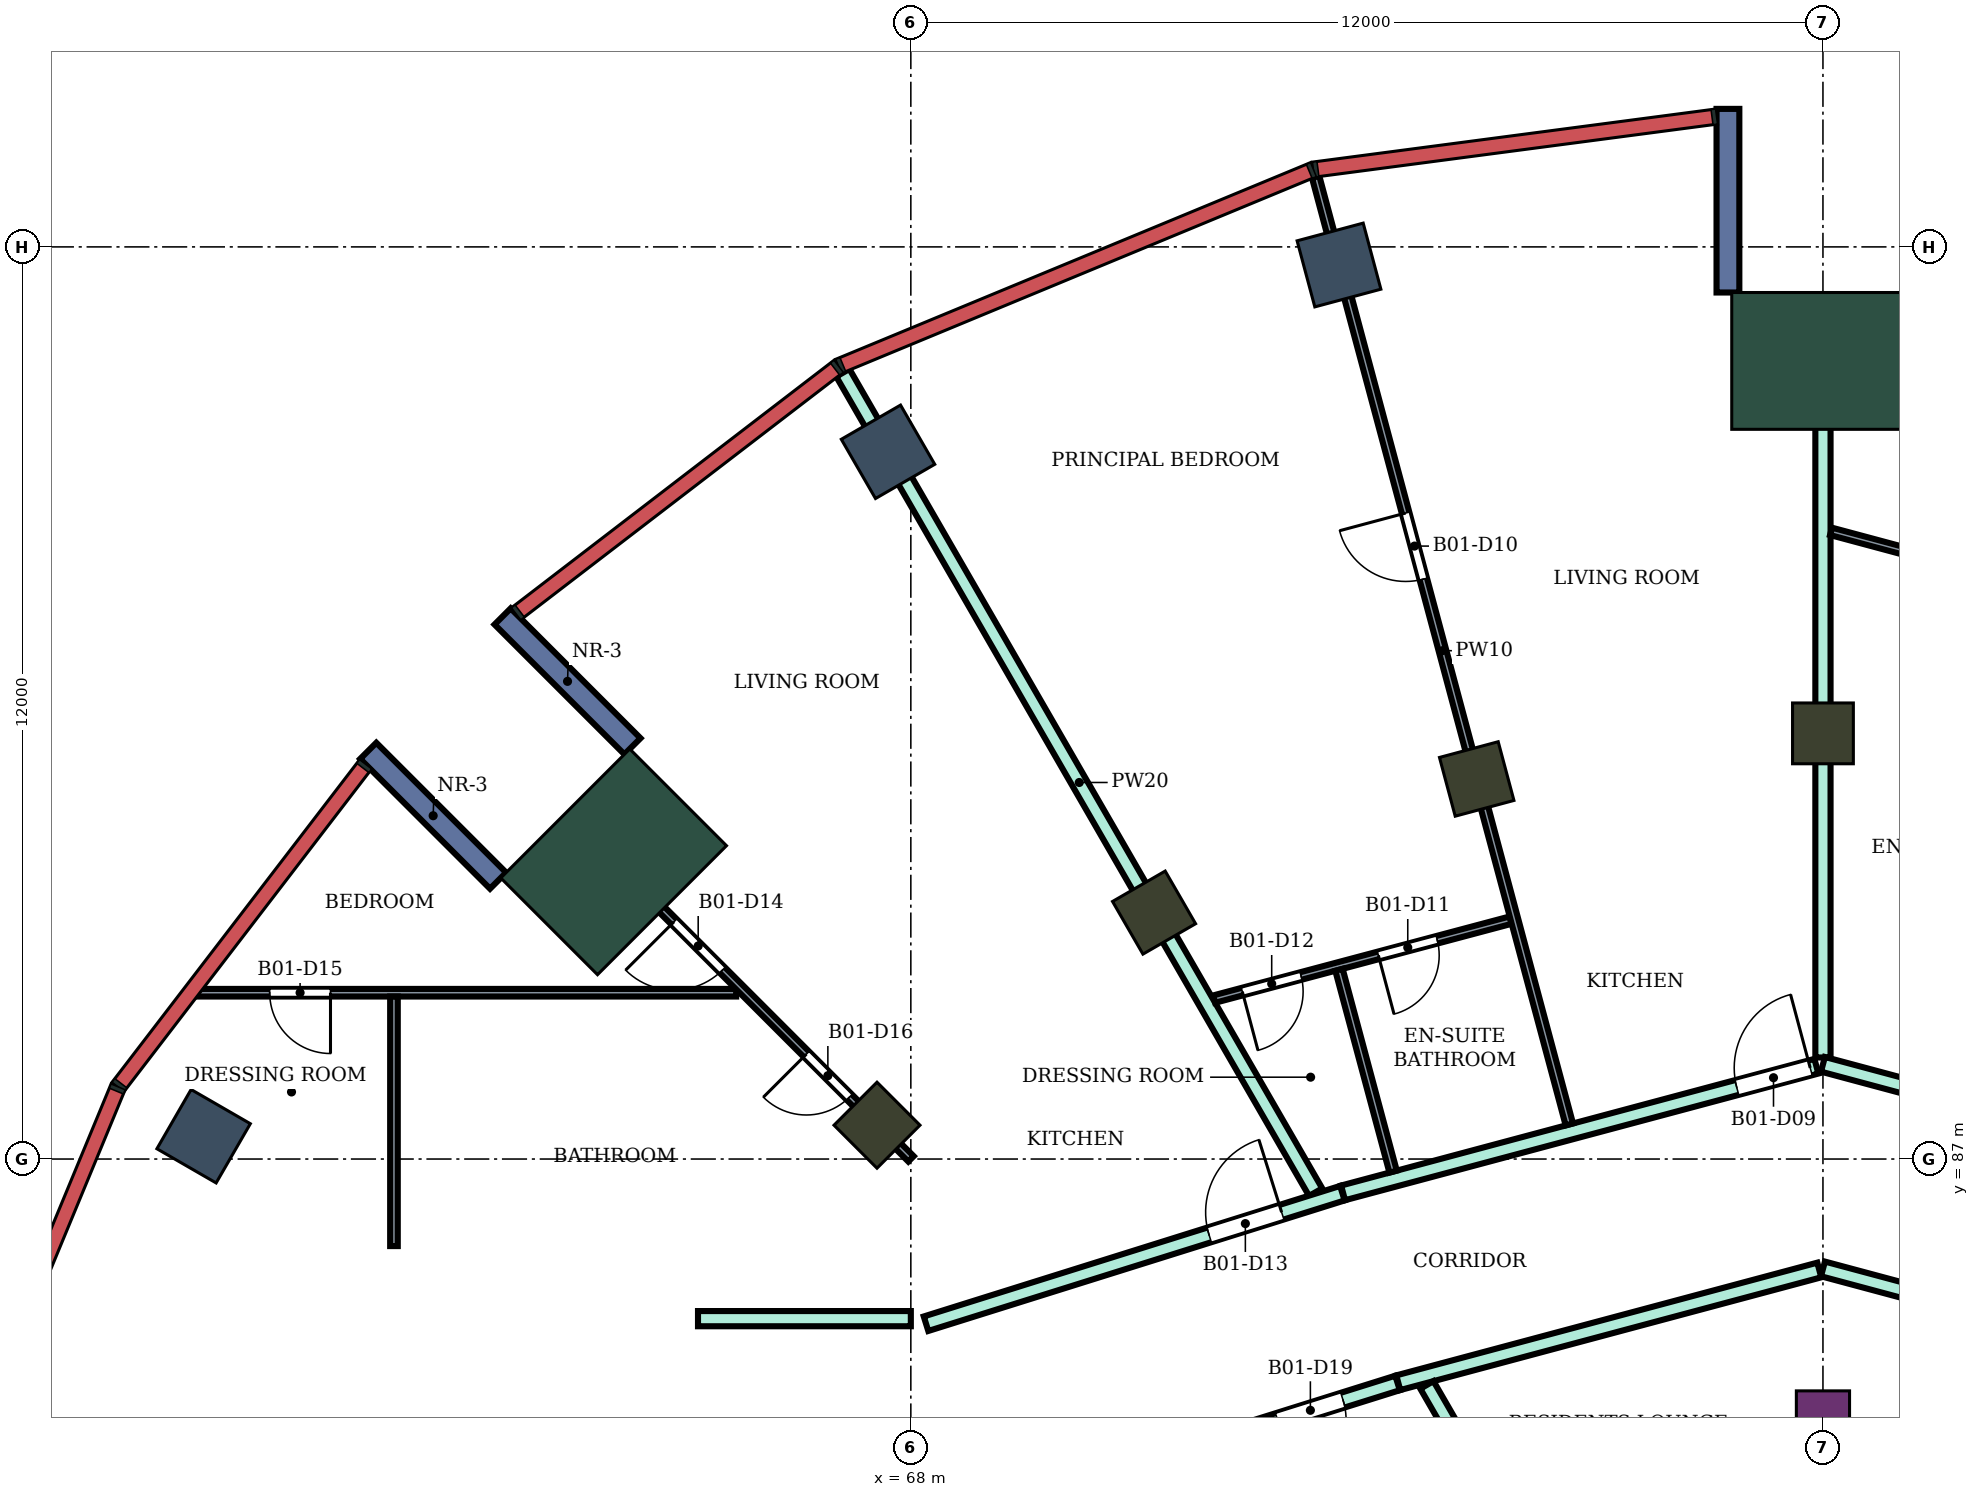
"""IFC4 building model, lengths in metres.
Left out: names, types, materials, properties, quantities, classifications, styles, units other than length and angle.
Written with IfcOpenShell. Run it as: python <this file> out.ifc"""

import sys

from ifc_helpers import new_model, si_unit, direction, frame, frame_2d, origin, origin_2d, place, context, subcontext, project, spatial, rectangle, extrude, element, fill, save


model = new_model("IFC4")
c1 = context("Model", 3, precision=1e-05, world=origin(), true_north=direction((0.0, 1.0)))
c2 = subcontext(c1, "Body", "Model", "MODEL_VIEW")
j1 = project(units=[si_unit("LENGTHUNIT", "METRE"), si_unit("PLANEANGLEUNIT", "RADIAN")], contexts=[c1])
p1 = place(None, origin())
s1 = spatial("IfcSite", under=j1, at=p1, CompositionType="ELEMENT")
p2 = place(p1, origin())
s2 = spatial("IfcBuilding", under=s1, at=p2, CompositionType="ELEMENT")
p3 = place(p2, frame((0.0, 0.0, 216.7)))
s3 = spatial("IfcBuildingStorey", under=s2, at=p3, CompositionType="ELEMENT", Elevation=216.7)
for number, where, z_axis, x_axis in (
    (1, (73.633, 98.762, 0.0), (0.0, 0.0, 1.0), (-0.259, 0.966, 0.0)),
    (2, (67.7, 96.304, 0.0), (0.0, 0.0, 1.0), (-0.5, 0.866, 0.0)),
    (3, (58.696, 87.3, 0.0), (0.0, 0.0, 1.0), (-0.866, 0.5, 0.0)),
):
    element("IfcColumn", number, at=place(p3, frame(where, z_axis=z_axis, x_axis=x_axis)), inside=s3, PredefinedType="COLUMN", context=c2, shape_type="SweptSolid", body=[
        extrude(rectangle(XDim=0.9, YDim=0.9, at=origin_2d()), origin(), (0.0, 0.0, 1.0), 4.2),
    ])
for number, where, z_axis, x_axis in (
    (4, (80.0, 92.6, 0.0), (0.0, 0.0, 1.0), (0.0, 1.0, 0.0)),
    (5, (75.445, 92.0, 0.0), (0.0, 0.0, 1.0), (-0.259, 0.966, 0.0)),
    (6, (71.2, 90.242, 0.0), (0.0, 0.0, 1.0), (-0.5, 0.866, 0.0)),
    (7, (67.555, 87.445, 0.0), (0.0, 0.0, 1.0), (-0.707, 0.707, 0.0)),
):
    element("IfcColumn", number, at=place(p3, frame(where, z_axis=z_axis, x_axis=x_axis)), inside=s3, PredefinedType="COLUMN", context=c2, shape_type="SweptSolid", body=[
        extrude(rectangle(XDim=0.8, YDim=0.8, at=origin_2d()), origin(), (0.0, 0.0, 1.0), 4.2),
    ])
p4 = place(p3, frame((80.0, 83.6, 0.0), z_axis=(0.0, 0.0, 1.0), x_axis=(0.0, 1.0, 0.0)))
e8 = element("IfcColumn", 8, at=p4, inside=s3, PredefinedType="COLUMN", context=c2, shape_type="SweptSolid", body=[
    extrude(rectangle(XDim=0.7, YDim=0.7, at=origin_2d()), origin(), (0.0, 0.0, 1.0), 4.2),
])
for number, where, z_axis, x_axis in (
    (9, (80.0, 97.5, 0.0), (0.0, 0.0, 1.0), (0.0, 1.0, 0.0)),
    (10, (64.09, 90.91, 0.0), (0.0, 0.0, 1.0), (-0.707, 0.707, 0.0)),
):
    element("IfcColumn", number, at=place(p3, frame(where, z_axis=z_axis, x_axis=x_axis)), inside=s3, PredefinedType="COLUMN", context=c2, shape_type="SweptSolid", body=[
        extrude(rectangle(XDim=1.8, YDim=2.4, at=origin_2d()), origin(), (0.0, 0.0, 1.0), 4.2),
    ])
for number, where, z_axis, x_axis in (
    (11, (78.75, 98.4, 0.0), (0.0, 0.0, 1.0), (0.0, 1.0, 0.0)),
    (12, (64.338, 92.43, 0.0), (0.0, 0.0, 1.0), (-0.707, 0.707, 0.0)),
    (13, (62.57, 90.662, 0.0), (0.0, 0.0, 1.0), (-0.707, 0.707, 0.0)),
):
    element("IfcWall", number, at=place(p3, frame(where, z_axis=z_axis, x_axis=x_axis)), inside=s3, PredefinedType="NOTDEFINED", context=c2, shape_type="SweptSolid", body=[
        extrude(rectangle(XDim=2.416, YDim=0.3, at=frame_2d((1.208, 0.0))), origin(), (0.0, 0.0, 1.0), 4.2),
    ])
p5 = place(p3, frame((65.2, 84.9, 0.0), z_axis=(0.0, 0.0, 1.0), x_axis=(1.0, 0.0, 0.0)))
e14 = element("IfcWall", 14, at=p5, inside=s3, PredefinedType="PARTITIONING", context=c2, shape_type="SweptSolid", body=[
    extrude(rectangle(XDim=2.8, YDim=0.2, at=frame_2d((1.4, 0.0))), origin(), (0.0, 0.0, 1.0), 3.75),
])
p6 = place(p3, frame((67.105, 97.344, 0.0), z_axis=(0.0, 0.0, 1.0), x_axis=(0.499841888023, -0.866116670534, 0.0)))
e15 = element("IfcWall", 15, at=p6, inside=s3, PredefinedType="PARTITIONING", context=c2, shape_type="SweptSolid", body=[
    extrude(rectangle(XDim=12.446, YDim=0.2, at=frame_2d((6.223, 0.0))), origin(), (0.0, 0.0, 1.0), 3.75),
])
p7 = place(p3, frame((68.2, 84.833, 0.0), z_axis=(0.0, 0.0, 1.0), x_axis=(0.954204109499, 0.299156342762, 0.0)))
e16 = element("IfcWall", 16, at=p7, inside=s3, PredefinedType="PARTITIONING", context=c2, shape_type="SweptSolid", body=[
    extrude(rectangle(XDim=5.74, YDim=0.2, at=frame_2d((2.87, 0.0))), origin(), (0.0, 0.0, 1.0), 3.75),
])
p8 = place(p7, frame((3.903, 0.0, 0.0)))
e17 = element("IfcOpeningElement", 17, at=p8, cuts=e16, PredefinedType="OPENING", context=c2, shape_type="SweptSolid", body=[
    extrude(rectangle(XDim=1.0, YDim=2.1, at=frame_2d((0.5, 1.05))), frame((0.0, 0.11, 0.0), z_axis=(0.0, -1.0, 0.0), x_axis=(1.0, 0.0, 0.0)), (0.0, 0.0, 1.0), 0.22),
])
p9 = place(p3, frame((72.1, 83.332, 0.0), z_axis=(0.0, 0.0, 1.0), x_axis=(0.954233106619, 0.299063836383, 0.0)))
e18 = element("IfcWall", 18, at=p9, inside=s3, PredefinedType="PARTITIONING", context=c2, shape_type="SweptSolid", body=[
    extrude(rectangle(XDim=2.414, YDim=0.2, at=frame_2d((1.207, 0.0))), origin(), (0.0, 0.0, 1.0), 3.75),
])
p10 = place(p9, frame((0.762, 0.0, 0.0)))
e19 = element("IfcOpeningElement", 19, at=p10, cuts=e18, PredefinedType="OPENING", context=c2, shape_type="SweptSolid", body=[
    extrude(rectangle(XDim=0.9, YDim=2.1, at=frame_2d((0.45, 1.05))), frame((0.0, 0.11, 0.0), z_axis=(0.0, -1.0, 0.0), x_axis=(1.0, 0.0, 0.0)), (0.0, 0.0, 1.0), 0.22),
])
p11 = place(p3, frame((73.687, 86.555, 0.0), z_axis=(0.0, 0.0, 1.0), x_axis=(0.966020868517, 0.258464081818, 0.0)))
e20 = element("IfcWall", 20, at=p11, inside=s3, PredefinedType="PARTITIONING", context=c2, shape_type="SweptSolid", body=[
    extrude(rectangle(XDim=6.446, YDim=0.2, at=frame_2d((3.223, 0.0))), origin(), (0.0, 0.0, 1.0), 3.75),
])
p12 = place(p11, frame((5.362, 0.0, 0.0)))
e21 = element("IfcOpeningElement", 21, at=p12, cuts=e20, PredefinedType="OPENING", context=c2, shape_type="SweptSolid", body=[
    extrude(rectangle(XDim=1.0, YDim=2.1, at=frame_2d((0.5, 1.05))), frame((0.0, 0.11, 0.0), z_axis=(0.0, -1.0, 0.0), x_axis=(1.0, 0.0, 0.0)), (0.0, 0.0, 1.0), 0.22),
])
p13 = place(p3, frame((74.413, 84.057, 0.0), z_axis=(0.0, 0.0, 1.0), x_axis=(0.965970849692, 0.258650956976, 0.0)))
e22 = element("IfcWall", 22, at=p13, inside=s3, PredefinedType="PARTITIONING", context=c2, shape_type="SweptSolid", body=[
    extrude(rectangle(XDim=5.734, YDim=0.2, at=frame_2d((2.867, 0.0))), origin(), (0.0, 0.0, 1.0), 3.75),
])
p14 = place(p3, frame((74.79, 84.028, 0.0), z_axis=(0.0, 0.0, 1.0), x_axis=(0.499820708267, -0.866128893172, 0.0)))
e23 = element("IfcWall", 23, at=p14, inside=s3, PredefinedType="PARTITIONING", context=c2, shape_type="SweptSolid", body=[
    extrude(rectangle(XDim=2.725, YDim=0.2, at=frame_2d((1.362, 0.0))), origin(), (0.0, 0.0, 1.0), 3.75),
])
p15 = place(p3, frame((80.0, 85.554, 0.0), z_axis=(0.0, 0.0, 1.0), x_axis=(0.965894438951, -0.258936155845, 0.0)))
e24 = element("IfcWall", 24, at=p15, inside=s3, PredefinedType="PARTITIONING", context=c2, shape_type="SweptSolid", body=[
    extrude(rectangle(XDim=5.774, YDim=0.2, at=frame_2d((2.887, 0.0))), origin(), (0.0, 0.0, 1.0), 3.75),
])
p16 = place(p15, frame((1.841, 0.0, 0.0)))
e25 = element("IfcOpeningElement", 25, at=p16, cuts=e24, PredefinedType="OPENING", context=c2, shape_type="SweptSolid", body=[
    extrude(rectangle(XDim=1.8, YDim=2.1, at=frame_2d((0.9, 1.05))), frame((0.0, 0.11, 0.0), z_axis=(0.0, -1.0, 0.0), x_axis=(1.0, 0.0, 0.0)), (0.0, 0.0, 1.0), 0.22),
])
p17 = place(p3, frame((80.0, 88.336, 0.0), z_axis=(0.0, 0.0, 1.0), x_axis=(0.0, 1.0, 0.0)))
e26 = element("IfcWall", 26, at=p17, inside=s3, PredefinedType="PARTITIONING", context=c2, shape_type="SweptSolid", body=[
    extrude(rectangle(XDim=9.864, YDim=0.2, at=frame_2d((4.932, 0.0))), origin(), (0.0, 0.0, 1.0), 3.75),
])
p18 = place(p3, frame((80.0, 88.246, 0.0), z_axis=(0.0, 0.0, 1.0), x_axis=(0.965866355913, -0.25904088966, 0.0)))
e27 = element("IfcWall", 27, at=p18, inside=s3, PredefinedType="PARTITIONING", context=c2, shape_type="SweptSolid", body=[
    extrude(rectangle(XDim=6.526, YDim=0.2, at=frame_2d((3.263, 0.0))), origin(), (0.0, 0.0, 1.0), 3.75),
])
p19 = place(p3, frame((58.6, 89.188, 0.0), z_axis=(0.0, 0.0, 1.0), x_axis=(1.0, 0.0, 0.0)))
e28 = element("IfcWall", 28, at=p19, inside=s3, PredefinedType="PARTITIONING", context=c2, shape_type="SweptSolid", body=[
    extrude(rectangle(XDim=7.102, YDim=0.1, at=frame_2d((3.551, 0.0))), origin(), (0.0, 0.0, 1.0), 3.75),
])
p20 = place(p19, frame((0.965, 0.0, 0.0)))
e29 = element("IfcOpeningElement", 29, at=p20, cuts=e28, PredefinedType="OPENING", context=c2, shape_type="SweptSolid", body=[
    extrude(rectangle(XDim=0.8, YDim=2.1, at=frame_2d((0.4, 1.05))), frame((0.0, 0.06, 0.0), z_axis=(0.0, -1.0, 0.0), x_axis=(1.0, 0.0, 0.0)), (0.0, 0.0, 1.0), 0.12),
])
p21 = place(p3, frame((61.2, 85.855, 0.0), z_axis=(0.0, 0.0, 1.0), x_axis=(0.0, 1.0, 0.0)))
e30 = element("IfcWall", 30, at=p21, inside=s3, PredefinedType="PARTITIONING", context=c2, shape_type="SweptSolid", body=[
    extrude(rectangle(XDim=3.283, YDim=0.1, at=frame_2d((1.642, 0.0))), origin(), (0.0, 0.0, 1.0), 3.75),
])
p22 = place(p3, frame((63.598, 91.408, 0.0), z_axis=(0.0, 0.0, 1.0), x_axis=(0.70693039891, -0.707283119477, 0.0)))
e31 = element("IfcWall", 31, at=p22, inside=s3, PredefinedType="PARTITIONING", context=c2, shape_type="SweptSolid", body=[
    extrude(rectangle(XDim=6.229, YDim=0.1, at=frame_2d((3.115, 0.0))), origin(), (0.0, 0.0, 1.0), 3.75),
])
p23 = place(p22, frame((1.819, 0.0, 0.0)))
e32 = element("IfcOpeningElement", 32, at=p23, cuts=e31, PredefinedType="OPENING", context=c2, shape_type="SweptSolid", body=[
    extrude(rectangle(XDim=0.9, YDim=2.1, at=frame_2d((0.45, 1.05))), frame((0.0, 0.06, 0.0), z_axis=(0.0, -1.0, 0.0), x_axis=(1.0, 0.0, 0.0)), (0.0, 0.0, 1.0), 0.12),
])
p24 = place(p22, frame((4.282, 0.0, 0.0)))
e33 = element("IfcOpeningElement", 33, at=p24, cuts=e31, PredefinedType="OPENING", context=c2, shape_type="SweptSolid", body=[
    extrude(rectangle(XDim=0.8, YDim=2.1, at=frame_2d((0.4, 1.05))), frame((0.0, 0.06, 0.0), z_axis=(0.0, -1.0, 0.0), x_axis=(1.0, 0.0, 0.0)), (0.0, 0.0, 1.0), 0.12),
])
p25 = place(p3, frame((71.991, 89.104, 0.0), z_axis=(0.0, 0.0, 1.0), x_axis=(0.96632826418, 0.257312428472, 0.0)))
e34 = element("IfcWall", 34, at=p25, inside=s3, PredefinedType="PARTITIONING", context=c2, shape_type="SweptSolid", body=[
    extrude(rectangle(XDim=4.035, YDim=0.1, at=frame_2d((2.018, 0.0))), origin(), (0.0, 0.0, 1.0), 3.75),
])
p26 = place(p25, frame((2.235, 0.0, 0.0)))
e35 = element("IfcOpeningElement", 35, at=p26, cuts=e34, PredefinedType="OPENING", context=c2, shape_type="SweptSolid", body=[
    extrude(rectangle(XDim=0.8, YDim=2.1, at=frame_2d((0.4, 1.05))), frame((0.0, 0.06, 0.0), z_axis=(0.0, -1.0, 0.0), x_axis=(1.0, 0.0, 0.0)), (0.0, 0.0, 1.0), 0.12),
])
p27 = place(p25, frame((0.383, 0.0, 0.0)))
e36 = element("IfcOpeningElement", 36, at=p27, cuts=e34, PredefinedType="OPENING", context=c2, shape_type="SweptSolid", body=[
    extrude(rectangle(XDim=0.8, YDim=2.1, at=frame_2d((0.4, 1.05))), frame((0.0, 0.06, 0.0), z_axis=(0.0, -1.0, 0.0), x_axis=(1.0, 0.0, 0.0)), (0.0, 0.0, 1.0), 0.12),
])
p28 = place(p3, frame((73.326, 99.92, 0.0), z_axis=(0.0, 0.0, 1.0), x_axis=(0.258675243249, -0.965964346407, 0.0)))
e37 = element("IfcWall", 37, at=p28, inside=s3, PredefinedType="PARTITIONING", context=c2, shape_type="SweptSolid", body=[
    extrude(rectangle(XDim=12.904, YDim=0.1, at=frame_2d((6.452, 0.0))), origin(), (0.0, 0.0, 1.0), 3.75),
])
p29 = place(p28, frame((4.577, 0.0, 0.0)))
e38 = element("IfcOpeningElement", 38, at=p29, cuts=e37, PredefinedType="OPENING", context=c2, shape_type="SweptSolid", body=[
    extrude(rectangle(XDim=0.9, YDim=2.1, at=frame_2d((0.45, 1.05))), frame((0.0, 0.06, 0.0), z_axis=(0.0, -1.0, 0.0), x_axis=(1.0, 0.0, 0.0)), (0.0, 0.0, 1.0), 0.12),
])
p30 = place(p3, frame((73.633, 89.49, 0.0), z_axis=(0.0, 0.0, 1.0), x_axis=(0.259005329799, -0.965875892201, 0.0)))
e39 = element("IfcWall", 39, at=p30, inside=s3, PredefinedType="PARTITIONING", context=c2, shape_type="SweptSolid", body=[
    extrude(rectangle(XDim=2.75, YDim=0.1, at=frame_2d((1.375, 0.0))), origin(), (0.0, 0.0, 1.0), 3.75),
])
p31 = place(p3, frame((80.106, 95.258, 0.0), z_axis=(0.0, 0.0, 1.0), x_axis=(0.965862886122, -0.259053826862, 0.0)))
e40 = element("IfcWall", 40, at=p31, inside=s3, PredefinedType="PARTITIONING", context=c2, shape_type="SweptSolid", body=[
    extrude(rectangle(XDim=10.331, YDim=0.1, at=frame_2d((5.166, 0.0))), origin(), (0.0, 0.0, 1.0), 3.75),
])
p32 = place(p31, frame((2.115, 0.0, 0.0)))
e41 = element("IfcOpeningElement", 41, at=p32, cuts=e40, PredefinedType="OPENING", context=c2, shape_type="SweptSolid", body=[
    extrude(rectangle(XDim=0.8, YDim=2.1, at=frame_2d((0.4, 1.05))), frame((0.0, 0.06, 0.0), z_axis=(0.0, -1.0, 0.0), x_axis=(1.0, 0.0, 0.0)), (0.0, 0.0, 1.0), 0.12),
])
p33 = place(p12, origin())
e42 = element("IfcDoor", 42, at=p33, inside=s3, OperationType="SINGLE_SWING_RIGHT", PredefinedType="DOOR", context=c2, shape_type="SweptSolid", body=[
    extrude(rectangle(XDim=1.0, YDim=2.1, at=frame_2d((0.5, 1.05))), frame((0.0, 0.025, 0.0), z_axis=(0.0, -1.0, 0.0), x_axis=(1.0, 0.0, 0.0)), (0.0, 0.0, 1.0), 0.05),
])
fill(e21, e42)
p34 = place(p29, frame((0.9, 0.0, 0.0), z_axis=(0.0, 0.0, 1.0), x_axis=(-1.0, 0.0, 0.0)))
e43 = element("IfcDoor", 43, at=p34, inside=s3, OperationType="SINGLE_SWING_RIGHT", PredefinedType="DOOR", context=c2, shape_type="SweptSolid", body=[
    extrude(rectangle(XDim=0.9, YDim=2.1, at=frame_2d((0.45, 1.05))), frame((0.0, 0.025, 0.0), z_axis=(0.0, -1.0, 0.0), x_axis=(1.0, 0.0, 0.0)), (0.0, 0.0, 1.0), 0.05),
])
fill(e38, e43)
p35 = place(p26, frame((0.8, 0.0, 0.0), z_axis=(0.0, 0.0, 1.0), x_axis=(-1.0, 0.0, 0.0)))
e44 = element("IfcDoor", 44, at=p35, inside=s3, OperationType="SINGLE_SWING_RIGHT", PredefinedType="DOOR", context=c2, shape_type="SweptSolid", body=[
    extrude(rectangle(XDim=0.8, YDim=2.1, at=frame_2d((0.4, 1.05))), frame((0.0, 0.025, 0.0), z_axis=(0.0, -1.0, 0.0), x_axis=(1.0, 0.0, 0.0)), (0.0, 0.0, 1.0), 0.05),
])
fill(e35, e44)
p36 = place(p27, frame((0.8, 0.0, 0.0), z_axis=(0.0, 0.0, 1.0), x_axis=(-1.0, 0.0, 0.0)))
e45 = element("IfcDoor", 45, at=p36, inside=s3, OperationType="SINGLE_SWING_RIGHT", PredefinedType="DOOR", context=c2, shape_type="SweptSolid", body=[
    extrude(rectangle(XDim=0.8, YDim=2.1, at=frame_2d((0.4, 1.05))), frame((0.0, 0.025, 0.0), z_axis=(0.0, -1.0, 0.0), x_axis=(1.0, 0.0, 0.0)), (0.0, 0.0, 1.0), 0.05),
])
fill(e36, e45)
p37 = place(p8, origin())
e46 = element("IfcDoor", 46, at=p37, inside=s3, OperationType="SINGLE_SWING_RIGHT", PredefinedType="DOOR", context=c2, shape_type="SweptSolid", body=[
    extrude(rectangle(XDim=1.0, YDim=2.1, at=frame_2d((0.5, 1.05))), frame((0.0, 0.025, 0.0), z_axis=(0.0, -1.0, 0.0), x_axis=(1.0, 0.0, 0.0)), (0.0, 0.0, 1.0), 0.05),
])
fill(e17, e46)
p38 = place(p23, frame((0.9, 0.0, 0.0), z_axis=(0.0, 0.0, 1.0), x_axis=(-1.0, 0.0, 0.0)))
e47 = element("IfcDoor", 47, at=p38, inside=s3, OperationType="SINGLE_SWING_RIGHT", PredefinedType="DOOR", context=c2, shape_type="SweptSolid", body=[
    extrude(rectangle(XDim=0.9, YDim=2.1, at=frame_2d((0.45, 1.05))), frame((0.0, 0.025, 0.0), z_axis=(0.0, -1.0, 0.0), x_axis=(1.0, 0.0, 0.0)), (0.0, 0.0, 1.0), 0.05),
])
fill(e32, e47)
p39 = place(p20, frame((0.8, 0.0, 0.0), z_axis=(0.0, 0.0, 1.0), x_axis=(-1.0, 0.0, 0.0)))
e48 = element("IfcDoor", 48, at=p39, inside=s3, OperationType="SINGLE_SWING_LEFT", PredefinedType="DOOR", context=c2, shape_type="SweptSolid", body=[
    extrude(rectangle(XDim=0.8, YDim=2.1, at=frame_2d((0.4, 1.05))), frame((0.0, 0.025, 0.0), z_axis=(0.0, -1.0, 0.0), x_axis=(1.0, 0.0, 0.0)), (0.0, 0.0, 1.0), 0.05),
])
fill(e29, e48)
p40 = place(p24, frame((0.8, 0.0, 0.0), z_axis=(0.0, 0.0, 1.0), x_axis=(-1.0, 0.0, 0.0)))
e49 = element("IfcDoor", 49, at=p40, inside=s3, OperationType="SINGLE_SWING_RIGHT", PredefinedType="DOOR", context=c2, shape_type="SweptSolid", body=[
    extrude(rectangle(XDim=0.8, YDim=2.1, at=frame_2d((0.4, 1.05))), frame((0.0, 0.025, 0.0), z_axis=(0.0, -1.0, 0.0), x_axis=(1.0, 0.0, 0.0)), (0.0, 0.0, 1.0), 0.05),
])
fill(e33, e49)
p41 = place(p10, frame((0.9, 0.0, 0.0), z_axis=(0.0, 0.0, 1.0), x_axis=(-1.0, 0.0, 0.0)))
e50 = element("IfcDoor", 50, at=p41, inside=s3, OperationType="SINGLE_SWING_RIGHT", PredefinedType="DOOR", context=c2, shape_type="SweptSolid", body=[
    extrude(rectangle(XDim=0.9, YDim=2.1, at=frame_2d((0.45, 1.05))), frame((0.0, 0.025, 0.0), z_axis=(0.0, -1.0, 0.0), x_axis=(1.0, 0.0, 0.0)), (0.0, 0.0, 1.0), 0.05),
])
fill(e19, e50)
save(model, sys.argv[1])
